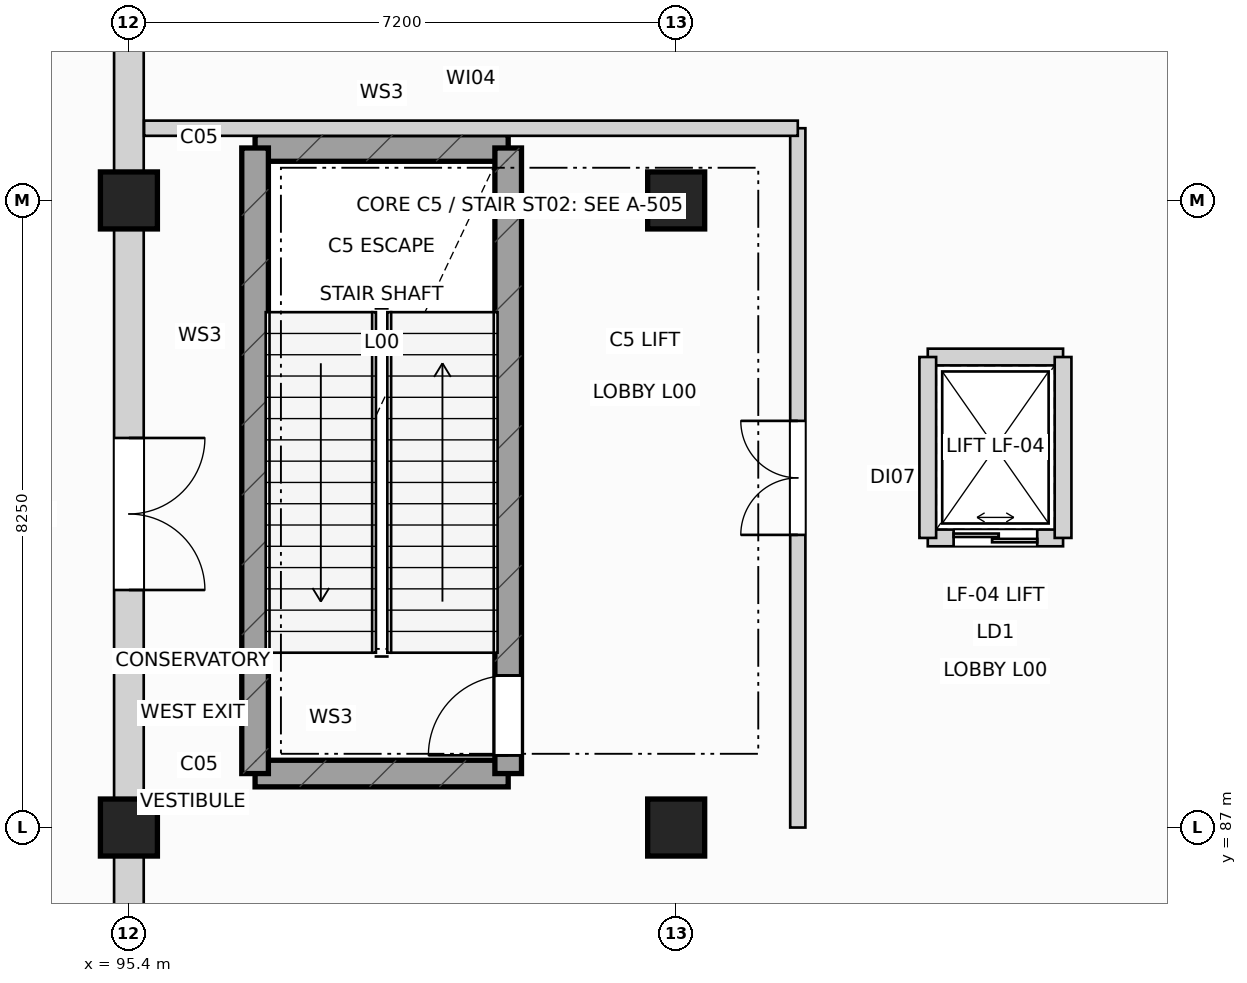
"""IFC4 building model, lengths in metres.
Left out: names, types, materials, properties, quantities, classifications, styles, units other than length and angle.
Written with IfcOpenShell. Run it as: python <this file> out.ifc"""

import sys

from ifc_helpers import new_model, si_unit, direction, frame, frame_2d, origin, origin_2d, place, context, subcontext, project, spatial, rectangle, extrude, element, fill, save


model = new_model("IFC4")
c1 = context("Model", 3, precision=1e-05, world=origin(), true_north=direction((0.0, 1.0)))
c2 = subcontext(c1, "Body", "Model", "MODEL_VIEW")
j1 = project(units=[si_unit("LENGTHUNIT", "METRE"), si_unit("PLANEANGLEUNIT", "RADIAN")], contexts=[c1])
p1 = place(None, origin())
s1 = spatial("IfcSite", under=j1, at=p1, CompositionType="ELEMENT")
p2 = place(p1, origin())
s2 = spatial("IfcBuilding", under=s1, at=p2, CompositionType="ELEMENT")
p3 = place(p2, origin())
s3 = spatial("IfcBuildingStorey", under=s2, at=p3, CompositionType="ELEMENT", Elevation=0.0)
for number, where, z_axis, x_axis in (
    (1, (95.4, 87.0, 0.0), (0.0, 0.0, 1.0), (1.0, 0.0, 0.0)),
    (2, (95.4, 95.25, 0.0), (0.0, 0.0, 1.0), (1.0, 0.0, 0.0)),
    (3, (102.6, 87.0, 0.0), (0.0, 0.0, 1.0), (1.0, 0.0, 0.0)),
    (4, (102.6, 95.25, 0.0), (0.0, 0.0, 1.0), (1.0, 0.0, 0.0)),
):
    element("IfcColumn", number, at=place(p3, frame(where, z_axis=z_axis, x_axis=x_axis)), inside=s3, PredefinedType="COLUMN", context=c2, shape_type="SweptSolid", body=[
        extrude(rectangle(XDim=0.75, YDim=0.75, at=origin_2d()), origin(), (0.0, 0.0, 1.0), 6.0),
    ])
p4 = place(p3, frame((95.4, 86.63, 0.0), z_axis=(0.0, 0.0, 1.0), x_axis=(0.0, -1.0, 0.0)))
e5 = element("IfcWall", 5, at=p4, inside=s3, PredefinedType="SOLIDWALL", context=c2, shape_type="SweptSolid", body=[
    extrude(rectangle(XDim=8.26, YDim=0.39, at=frame_2d((4.13, 0.0))), origin(), (0.0, 0.0, 1.0), 5.065),
])
p5 = place(p4, frame((3.23, 0.0, 0.9)))
e6 = element("IfcOpeningElement", 6, at=p5, cuts=e5, PredefinedType="OPENING", context=c2, shape_type="SweptSolid", body=[
    extrude(rectangle(XDim=1.8, YDim=2.3, at=frame_2d((0.9, 1.15))), frame((0.0, 0.205, 0.0), z_axis=(0.0, -1.0, 0.0), x_axis=(1.0, 0.0, 0.0)), (0.0, 0.0, 1.0), 0.41),
])
p6 = place(p3, frame((95.4, 94.88, 0.0), z_axis=(0.0, 0.0, 1.0), x_axis=(0.0, -1.0, 0.0)))
e7 = element("IfcWall", 7, at=p6, inside=s3, PredefinedType="SOLIDWALL", context=c2, shape_type="SweptSolid", body=[
    extrude(rectangle(XDim=7.51, YDim=0.39, at=frame_2d((3.755, 0.0))), origin(), (0.0, 0.0, 1.0), 5.065),
])
p7 = place(p6, frame((2.755, 0.0, 0.0)))
e8 = element("IfcOpeningElement", 8, at=p7, cuts=e7, PredefinedType="OPENING", context=c2, shape_type="SweptSolid", body=[
    extrude(rectangle(XDim=2.0, YDim=2.4, at=frame_2d((1.0, 1.2))), frame((0.0, 0.205, 0.0), z_axis=(0.0, -1.0, 0.0), x_axis=(1.0, 0.0, 0.0)), (0.0, 0.0, 1.0), 0.41),
])
p8 = place(p3, frame((95.4, 103.13, 0.0), z_axis=(0.0, 0.0, 1.0), x_axis=(0.0, -1.0, 0.0)))
e9 = element("IfcWall", 9, at=p8, inside=s3, PredefinedType="SOLIDWALL", context=c2, shape_type="SweptSolid", body=[
    extrude(rectangle(XDim=7.51, YDim=0.39, at=frame_2d((3.755, 0.0))), origin(), (0.0, 0.0, 1.0), 4.715),
])
p9 = place(p8, frame((2.705, 0.0, 0.9)))
e10 = element("IfcOpeningElement", 10, at=p9, cuts=e9, PredefinedType="OPENING", context=c2, shape_type="SweptSolid", body=[
    extrude(rectangle(XDim=2.1, YDim=2.5, at=frame_2d((1.05, 1.25))), frame((0.0, 0.205, 0.0), z_axis=(0.0, -1.0, 0.0), x_axis=(1.0, 0.0, 0.0)), (0.0, 0.0, 1.0), 0.41),
])
for number, where, z_axis, x_axis in (
    (11, (97.06, 87.71, 0.0), (0.0, 0.0, 1.0), (1.0, 0.0, 0.0)),
    (12, (97.06, 95.94, 0.0), (0.0, 0.0, 1.0), (1.0, 0.0, 0.0)),
):
    element("IfcWall", number, at=place(p3, frame(where, z_axis=z_axis, x_axis=x_axis)), inside=s3, PredefinedType="SHEAR", context=c2, shape_type="SweptSolid", body=[
        extrude(rectangle(XDim=3.33, YDim=0.35, at=frame_2d((1.665, 0.0))), origin(), (0.0, 0.0, 1.0), 5.7),
    ])
p10 = place(p3, frame((97.06, 87.71, 0.0), z_axis=(0.0, 0.0, 1.0), x_axis=(0.0, 1.0, 0.0)))
e13 = element("IfcWall", 13, at=p10, inside=s3, PredefinedType="SHEAR", context=c2, shape_type="SweptSolid", body=[
    extrude(rectangle(XDim=8.23, YDim=0.35, at=frame_2d((4.115, 0.0))), origin(), (0.0, 0.0, 1.0), 5.7),
])
p11 = place(p3, frame((100.39, 87.71, 0.0), z_axis=(0.0, 0.0, 1.0), x_axis=(0.0, 1.0, 0.0)))
e14 = element("IfcWall", 14, at=p11, inside=s3, PredefinedType="SHEAR", context=c2, shape_type="SweptSolid", body=[
    extrude(rectangle(XDim=8.23, YDim=0.35, at=frame_2d((4.115, 0.0))), origin(), (0.0, 0.0, 1.0), 5.7),
])
p12 = place(p11, frame((0.24, 0.0, 0.0)))
e15 = element("IfcOpeningElement", 15, at=p12, cuts=e14, PredefinedType="OPENING", context=c2, shape_type="SweptSolid", body=[
    extrude(rectangle(XDim=1.05, YDim=2.18, at=frame_2d((0.525, 1.09))), frame((0.0, 0.185, 0.0), z_axis=(0.0, -1.0, 0.0), x_axis=(1.0, 0.0, 0.0)), (0.0, 0.0, 1.0), 0.37),
])
p13 = place(p3, frame((105.91, 90.81, 0.0), z_axis=(0.0, 0.0, 1.0), x_axis=(1.0, 0.0, 0.0)))
e16 = element("IfcWall", 16, at=p13, inside=s3, PredefinedType="PARTITIONING", context=c2, shape_type="SweptSolid", body=[
    extrude(rectangle(XDim=1.78, YDim=0.22, at=frame_2d((0.89, 0.0))), origin(), (0.0, 0.0, 1.0), 5.665),
])
p14 = place(p13, frame((0.34, 0.0, 0.0)))
e17 = element("IfcOpeningElement", 17, at=p14, cuts=e16, PredefinedType="OPENING", context=c2, shape_type="SweptSolid", body=[
    extrude(rectangle(XDim=1.1, YDim=2.18, at=frame_2d((0.55, 1.09))), frame((0.0, 0.12, 0.0), z_axis=(0.0, -1.0, 0.0), x_axis=(1.0, 0.0, 0.0)), (0.0, 0.0, 1.0), 0.24),
])
p15 = place(p3, frame((105.91, 93.19, 0.0), z_axis=(0.0, 0.0, 1.0), x_axis=(1.0, 0.0, 0.0)))
e18 = element("IfcWall", 18, at=p15, inside=s3, PredefinedType="PARTITIONING", context=c2, shape_type="SweptSolid", body=[
    extrude(rectangle(XDim=1.78, YDim=0.22, at=frame_2d((0.89, 0.0))), origin(), (0.0, 0.0, 1.0), 5.665),
])
for number, where, z_axis, x_axis in (
    (19, (105.91, 90.81, 0.0), (0.0, 0.0, 1.0), (0.0, 1.0, 0.0)),
    (20, (107.69, 90.81, 0.0), (0.0, 0.0, 1.0), (0.0, 1.0, 0.0)),
):
    element("IfcWall", number, at=place(p3, frame(where, z_axis=z_axis, x_axis=x_axis)), inside=s3, PredefinedType="PARTITIONING", context=c2, shape_type="SweptSolid", body=[
        extrude(rectangle(XDim=2.38, YDim=0.22, at=frame_2d((1.19, 0.0))), origin(), (0.0, 0.0, 1.0), 5.665),
    ])
p16 = place(p3, frame((104.2, 87.0, 0.0), z_axis=(0.0, 0.0, 1.0), x_axis=(0.0, 1.0, 0.0)))
e21 = element("IfcWall", 21, at=p16, inside=s3, PredefinedType="PARTITIONING", context=c2, shape_type="SweptSolid", body=[
    extrude(rectangle(XDim=9.2, YDim=0.2, at=frame_2d((4.6, 0.0))), origin(), (0.0, 0.0, 1.0), 5.075),
])
p17 = place(p16, frame((3.85, 0.0, 0.0)))
e22 = element("IfcOpeningElement", 22, at=p17, cuts=e21, PredefinedType="OPENING", context=c2, shape_type="SweptSolid", body=[
    extrude(rectangle(XDim=1.5, YDim=2.2, at=frame_2d((0.75, 1.1))), frame((0.0, 0.11, 0.0), z_axis=(0.0, -1.0, 0.0), x_axis=(1.0, 0.0, 0.0)), (0.0, 0.0, 1.0), 0.22),
])
p18 = place(p3, frame((95.6, 96.2, 0.0), z_axis=(0.0, 0.0, 1.0), x_axis=(1.0, 0.0, 0.0)))
e23 = element("IfcWall", 23, at=p18, inside=s3, PredefinedType="PARTITIONING", context=c2, shape_type="SweptSolid", body=[
    extrude(rectangle(XDim=8.6, YDim=0.2, at=frame_2d((4.3, 0.0))), origin(), (0.0, 0.0, 1.0), 5.165),
])
p19 = place(p7, origin())
e24 = element("IfcDoor", 24, at=p19, inside=s3, OperationType="DOUBLE_DOOR_SINGLE_SWING", PredefinedType="DOOR", context=c2, shape_type="SweptSolid", body=[
    extrude(rectangle(XDim=2.0, YDim=2.4, at=frame_2d((1.0, 1.2))), frame((0.0, 0.025, 0.0), z_axis=(0.0, -1.0, 0.0), x_axis=(1.0, 0.0, 0.0)), (0.0, 0.0, 1.0), 0.05),
])
fill(e8, e24)
p20 = place(p12, origin())
e25 = element("IfcDoor", 25, at=p20, inside=s3, OperationType="SINGLE_SWING_LEFT", PredefinedType="DOOR", context=c2, shape_type="SweptSolid", body=[
    extrude(rectangle(XDim=1.05, YDim=2.18, at=frame_2d((0.525, 1.09))), frame((0.0, 0.025, 0.0), z_axis=(0.0, -1.0, 0.0), x_axis=(1.0, 0.0, 0.0)), (0.0, 0.0, 1.0), 0.05),
])
fill(e15, e25)
p21 = place(p14, origin())
e26 = element("IfcDoor", 26, at=p21, inside=s3, OperationType="DOUBLE_DOOR_SLIDING", PredefinedType="DOOR", context=c2, shape_type="SweptSolid", body=[
    extrude(rectangle(XDim=1.1, YDim=2.18, at=frame_2d((0.55, 1.09))), frame((0.0, 0.025, 0.0), z_axis=(0.0, -1.0, 0.0), x_axis=(1.0, 0.0, 0.0)), (0.0, 0.0, 1.0), 0.05),
])
fill(e17, e26)
p22 = place(p17, origin())
e27 = element("IfcDoor", 27, at=p22, inside=s3, OperationType="DOUBLE_DOOR_SINGLE_SWING", PredefinedType="DOOR", context=c2, shape_type="SweptSolid", body=[
    extrude(rectangle(XDim=1.5, YDim=2.2, at=frame_2d((0.75, 1.1))), frame((0.0, 0.025, 0.0), z_axis=(0.0, -1.0, 0.0), x_axis=(1.0, 0.0, 0.0)), (0.0, 0.0, 1.0), 0.05),
])
fill(e22, e27)
save(model, sys.argv[1])
